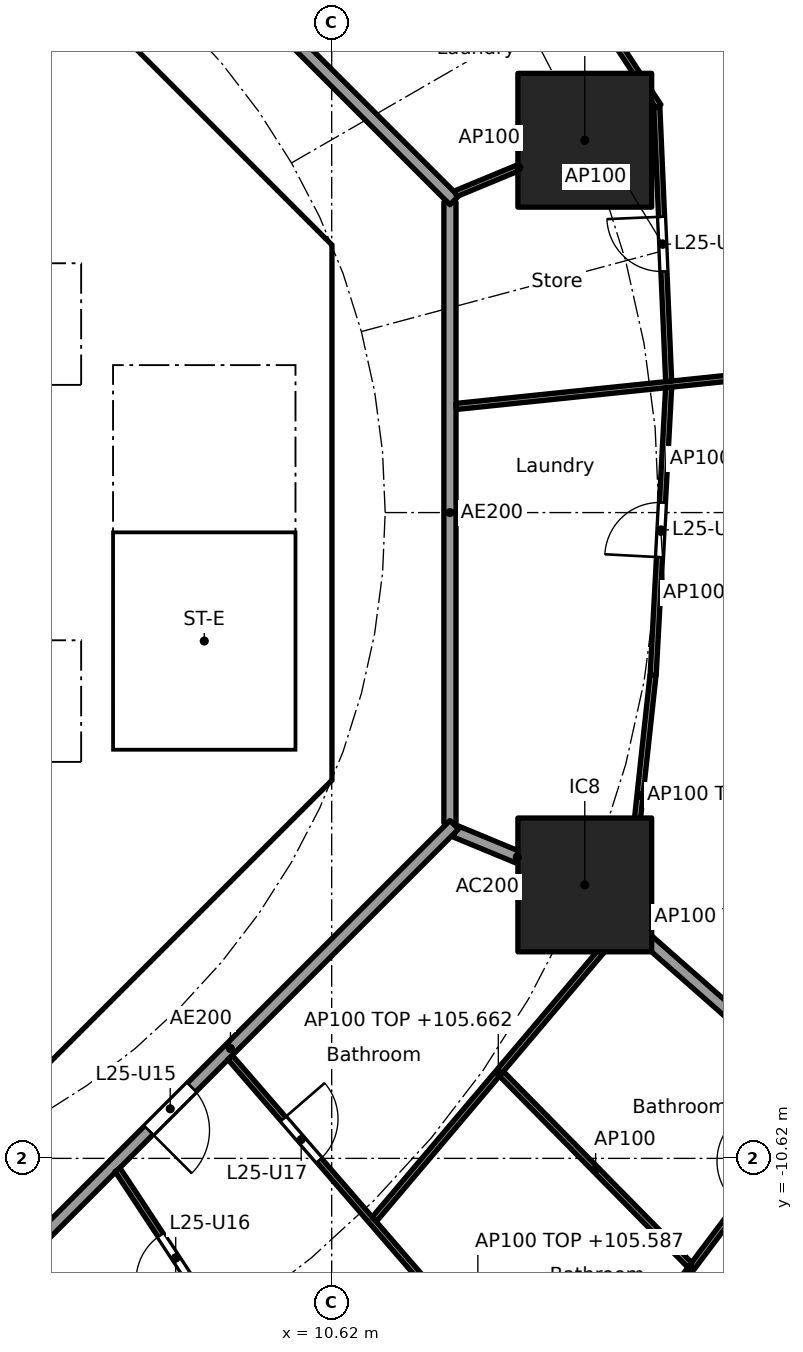
"""IFC4 building model, lengths in metres.
Left out: names, types, materials, properties, quantities, classifications, styles, units other than length and angle.
Written with IfcOpenShell. Run it as: python <this file> out.ifc"""

import sys

from ifc_helpers import new_model, si_unit, direction, frame, frame_2d, origin, origin_2d, place, context, subcontext, project, spatial, polyline, rectangle, outline, extrude, element, fill, save


model = new_model("IFC4")
c1 = context("Model", 3, precision=1e-05, world=origin(), true_north=direction((0.0, 1.0)))
c2 = subcontext(c1, "Body", "Model", "MODEL_VIEW")
j1 = project(units=[si_unit("LENGTHUNIT", "METRE"), si_unit("PLANEANGLEUNIT", "RADIAN")], contexts=[c1])
p1 = place(None, origin())
s1 = spatial("IfcSite", under=j1, at=p1, CompositionType="ELEMENT")
p2 = place(p1, origin())
s2 = spatial("IfcBuilding", under=s1, at=p2, CompositionType="ELEMENT")
p3 = place(p2, frame((0.0, 0.0, 102.9)))
s3 = spatial("IfcBuildingStorey", under=s2, at=p3, CompositionType="ELEMENT", Elevation=102.9)
for number, where, z_axis, x_axis in (
    (1, (14.782, 6.123, 0.0), (0.0, 0.0, 1.0), (1.0, 0.0, 0.0)),
    (2, (14.782, -6.123, 0.0), (0.0, 0.0, 1.0), (1.0, 0.0, 0.0)),
):
    element("IfcColumn", number, at=place(p3, frame(where, z_axis=z_axis, x_axis=x_axis)), inside=s3, PredefinedType="COLUMN", context=c2, shape_type="SweptSolid", body=[
        extrude(rectangle(XDim=2.2, YDim=2.2, at=origin_2d()), origin(), (0.0, 0.0, 1.0), 3.7),
    ])
p4 = place(p3, frame((9.988, 4.613, 0.0), z_axis=(0.0, 0.0, 1.0), x_axis=(-0.707106781187, 0.707106781187, 0.0)))
e3 = element("IfcWall", 3, at=p4, inside=s3, PredefinedType="SHEAR", context=c2, shape_type="SweptSolid", body=[
    extrude(rectangle(XDim=7.602, YDim=0.6, at=frame_2d((3.801, 0.0))), origin(), (0.0, 0.0, 1.0), 3.44),
])
p5 = place(p4, frame((3.201, 0.0, 0.0)))
e4 = element("IfcOpeningElement", 4, at=p5, cuts=e3, PredefinedType="OPENING", context=c2, shape_type="SweptSolid", body=[
    extrude(rectangle(XDim=1.2, YDim=2.1, at=frame_2d((0.6, 1.05))), frame((0.0, 0.31, 0.0), z_axis=(0.0, -1.0, 0.0), x_axis=(1.0, 0.0, 0.0)), (0.0, 0.0, 1.0), 0.62),
])
p6 = place(p3, frame((4.613, -9.988, 0.0), z_axis=(0.0, 0.0, 1.0), x_axis=(0.707106781187, 0.707106781187, 0.0)))
e5 = element("IfcWall", 5, at=p6, inside=s3, PredefinedType="SHEAR", context=c2, shape_type="SweptSolid", body=[
    extrude(rectangle(XDim=7.602, YDim=0.6, at=frame_2d((3.801, 0.0))), origin(), (0.0, 0.0, 1.0), 3.44),
])
p7 = place(p6, frame((3.201, 0.0, 0.0)))
e6 = element("IfcOpeningElement", 6, at=p7, cuts=e5, PredefinedType="OPENING", context=c2, shape_type="SweptSolid", body=[
    extrude(rectangle(XDim=1.2, YDim=2.1, at=frame_2d((0.6, 1.05))), frame((0.0, 0.31, 0.0), z_axis=(0.0, -1.0, 0.0), x_axis=(1.0, 0.0, 0.0)), (0.0, 0.0, 1.0), 0.62),
])
p8 = place(p3, frame((-6.7, 2.0, 0.0), z_axis=(0.0, 0.0, 1.0), x_axis=(1.0, 0.0, 0.0)))
e7 = element("IfcWall", 7, at=p8, inside=s3, PredefinedType="SOLIDWALL", context=c2, shape_type="SweptSolid", body=[
    extrude(rectangle(XDim=13.4, YDim=0.2, at=frame_2d((6.7, 0.0))), origin(), (0.0, 0.0, 1.0), 3.44),
])
p9 = place(p8, frame((0.65, 0.0, 0.0)))
e8 = element("IfcOpeningElement", 8, at=p9, cuts=e7, PredefinedType="OPENING", context=c2, shape_type="SweptSolid", body=[
    extrude(rectangle(XDim=1.1, YDim=2.1, at=frame_2d((0.55, 1.05))), frame((0.0, 0.11, 0.0), z_axis=(0.0, -1.0, 0.0), x_axis=(1.0, 0.0, 0.0)), (0.0, 0.0, 1.0), 0.22),
])
p10 = place(p8, frame((2.85, 0.0, 0.0)))
e9 = element("IfcOpeningElement", 9, at=p10, cuts=e7, PredefinedType="OPENING", context=c2, shape_type="SweptSolid", body=[
    extrude(rectangle(XDim=1.1, YDim=2.1, at=frame_2d((0.55, 1.05))), frame((0.0, 0.11, 0.0), z_axis=(0.0, -1.0, 0.0), x_axis=(1.0, 0.0, 0.0)), (0.0, 0.0, 1.0), 0.22),
])
p11 = place(p8, frame((5.05, 0.0, 0.0)))
e10 = element("IfcOpeningElement", 10, at=p11, cuts=e7, PredefinedType="OPENING", context=c2, shape_type="SweptSolid", body=[
    extrude(rectangle(XDim=1.1, YDim=2.1, at=frame_2d((0.55, 1.05))), frame((0.0, 0.11, 0.0), z_axis=(0.0, -1.0, 0.0), x_axis=(1.0, 0.0, 0.0)), (0.0, 0.0, 1.0), 0.22),
])
p12 = place(p3, frame((6.7, 4.0, 0.0), z_axis=(0.0, 0.0, 1.0), x_axis=(1.0, 0.0, 0.0)))
e11 = element("IfcWall", 11, at=p12, inside=s3, PredefinedType="SOLIDWALL", context=c2, shape_type="SweptSolid", body=[
    extrude(rectangle(XDim=3.325, YDim=0.2, at=frame_2d((1.662, 0.0))), origin(), (0.0, 0.0, 1.0), 3.44),
])
p13 = place(p12, frame((1.25, 0.0, 0.0)))
e12 = element("IfcOpeningElement", 12, at=p13, cuts=e11, PredefinedType="OPENING", context=c2, shape_type="SweptSolid", body=[
    extrude(rectangle(XDim=1.1, YDim=2.1, at=frame_2d((0.55, 1.05))), frame((0.0, 0.11, 0.0), z_axis=(0.0, -1.0, 0.0), x_axis=(1.0, 0.0, 0.0)), (0.0, 0.0, 1.0), 0.22),
])
p14 = place(p3, frame((-6.7, -2.0, 0.0), z_axis=(0.0, 0.0, 1.0), x_axis=(1.0, 0.0, 0.0)))
e13 = element("IfcWall", 13, at=p14, inside=s3, PredefinedType="SOLIDWALL", context=c2, shape_type="SweptSolid", body=[
    extrude(rectangle(XDim=13.4, YDim=0.2, at=frame_2d((6.7, 0.0))), origin(), (0.0, 0.0, 1.0), 3.44),
])
p15 = place(p14, frame((0.65, 0.0, 0.0)))
e14 = element("IfcOpeningElement", 14, at=p15, cuts=e13, PredefinedType="OPENING", context=c2, shape_type="SweptSolid", body=[
    extrude(rectangle(XDim=1.1, YDim=2.1, at=frame_2d((0.55, 1.05))), frame((0.0, 0.11, 0.0), z_axis=(0.0, -1.0, 0.0), x_axis=(1.0, 0.0, 0.0)), (0.0, 0.0, 1.0), 0.22),
])
p16 = place(p14, frame((2.85, 0.0, 0.0)))
e15 = element("IfcOpeningElement", 15, at=p16, cuts=e13, PredefinedType="OPENING", context=c2, shape_type="SweptSolid", body=[
    extrude(rectangle(XDim=1.1, YDim=2.1, at=frame_2d((0.55, 1.05))), frame((0.0, 0.11, 0.0), z_axis=(0.0, -1.0, 0.0), x_axis=(1.0, 0.0, 0.0)), (0.0, 0.0, 1.0), 0.22),
])
p17 = place(p3, origin())
e16 = element("IfcWall", 16, at=p17, inside=s3, PredefinedType="SHEAR", context=c2, shape_type="SweptSolid", body=[
    extrude(outline(polyline([(9.776, -4.401), (10.025, -4.152), (10.025, -3.801), (10.025, 4.152), (9.776, 4.401), (10.2, 4.825), (10.625, 4.401), (10.625, -4.401), (10.2, -4.825), (9.776, -4.401)])), origin(), (0.0, 0.0, 1.0), 3.44),
])
p18 = place(p3, origin())
e17 = element("IfcWall", 17, at=p18, inside=s3, PredefinedType="SOLIDWALL", context=c2, shape_type="SweptSolid", body=[
    extrude(outline(polyline([(-6.7, -2.1), (-6.5, -2.1), (-6.5, -4.1), (-4.5, -4.1), (-4.5, -2.1), (-4.3, -2.1), (-4.3, -4.1), (-2.3, -4.1), (-2.3, -2.1), (-2.1, -2.1), (-2.1, -4.1), (-0.1, -4.1), (-0.1, -2.1), (0.1, -2.1), (0.1, -4.1), (2.1, -4.1), (2.1, -2.1), (2.3, -2.1), (2.3, -4.1), (4.3, -4.1), (4.3, -2.1), (4.5, -2.1), (4.5, -4.1), (6.5, -4.1), (6.5, -2.1), (6.7, -2.1), (6.7, -4.3), (-6.7, -4.3), (-6.7, -2.1)])), origin(), (0.0, 0.0, 1.0), 3.44),
])
p19 = place(p3, origin())
e18 = element("IfcWall", 18, at=p19, inside=s3, PredefinedType="SOLIDWALL", context=c2, shape_type="SweptSolid", body=[
    extrude(outline(polyline([(-6.5, 2.1), (-6.7, 2.1), (-6.7, 4.3), (6.7, 4.3), (6.7, 2.1), (6.5, 2.1), (6.5, 4.1), (4.5, 4.1), (4.5, 2.1), (4.3, 2.1), (4.3, 4.1), (2.3, 4.1), (2.3, 2.1), (2.1, 2.1), (2.1, 4.1), (0.1, 4.1), (0.1, 2.1), (-0.1, 2.1), (-0.1, 4.1), (-2.1, 4.1), (-2.1, 2.1), (-2.3, 2.1), (-2.3, 4.1), (-4.3, 4.1), (-4.3, 2.1), (-4.5, 2.1), (-4.5, 4.1), (-6.5, 4.1), (-6.5, 2.1)])), origin(), (0.0, 0.0, 1.0), 3.44),
])
p20 = place(p3, origin())
e19 = element("IfcWall", 19, at=p20, inside=s3, PredefinedType="SOLIDWALL", context=c2, shape_type="SweptSolid", body=[
    extrude(outline(polyline([(7.025, -3.9), (6.7, -3.9), (6.7, 3.9), (7.025, 3.9), (7.025, -3.9)])), origin(), (0.0, 0.0, 1.0), 3.44),
])
p21 = place(p3, origin())
e20 = element("IfcWall", 20, at=p21, inside=s3, PredefinedType="SOLIDWALL", context=c2, shape_type="SweptSolid", body=[
    extrude(outline(polyline([(10.025, -4.1), (6.7, -4.1), (6.7, -3.9), (10.025, -3.9), (10.025, -4.1)])), origin(), (0.0, 0.0, 1.0), 3.44),
])
p22 = place(p3, frame((12.657, -5.243, 0.0), z_axis=(0.0, 0.0, 1.0), x_axis=(0.923876145736, -0.382691608661, 0.0)))
e21 = element("IfcWall", 21, at=p22, inside=s3, PredefinedType="PARTITIONING", context=c2, shape_type="SweptSolid", body=[
    extrude(rectangle(XDim=2.2, YDim=0.2, at=frame_2d((1.1, 0.0))), origin(), (0.0, 0.0, 1.0), 3.44),
])
p23 = place(p3, frame((14.82, -6.156, 0.0), z_axis=(0.0, 0.0, 1.0), x_axis=(0.750582231659, -0.660777052808, 0.0)))
e22 = element("IfcWall", 22, at=p23, inside=s3, PredefinedType="PARTITIONING", context=c2, shape_type="SweptSolid", body=[
    extrude(rectangle(XDim=8.781, YDim=0.2, at=frame_2d((4.391, 0.0))), origin(), (0.0, 0.0, 1.0), 2.762),
])
p24 = place(p3, frame((12.565, -5.104, 0.0), z_axis=(0.0, 0.0, 1.0), x_axis=(0.0, 1.0, 0.0)))
e23 = element("IfcWall", 23, at=p24, inside=s3, PredefinedType="PARTITIONING", context=c2, shape_type="SweptSolid", body=[
    extrude(rectangle(XDim=10.209, YDim=0.2, at=frame_2d((5.104, 0.0))), origin(), (0.0, 0.0, 1.0), 3.44),
])
p25 = place(p3, frame((12.635, 5.134, 0.0), z_axis=(0.0, 0.0, 1.0), x_axis=(-0.707106781187, 0.707106781187, 0.0)))
e24 = element("IfcWall", 24, at=p25, inside=s3, PredefinedType="PARTITIONING", context=c2, shape_type="SweptSolid", body=[
    extrude(rectangle(XDim=10.609, YDim=0.2, at=frame_2d((5.305, 0.0))), origin(), (0.0, 0.0, 1.0), 3.44),
])
p26 = place(p25, frame((4.804, 0.0, 0.0)))
e25 = element("IfcOpeningElement", 25, at=p26, cuts=e24, PredefinedType="OPENING", context=c2, shape_type="SweptSolid", body=[
    extrude(rectangle(XDim=1.0, YDim=2.1, at=frame_2d((0.5, 1.05))), frame((0.0, 0.11, 0.0), z_axis=(0.0, -1.0, 0.0), x_axis=(1.0, 0.0, 0.0)), (0.0, 0.0, 1.0), 0.22),
])
p27 = place(p3, frame((5.275, -12.494, 0.0), z_axis=(0.0, 0.0, 1.0), x_axis=(0.707106781187, 0.707106781187, 0.0)))
e26 = element("IfcWall", 26, at=p27, inside=s3, PredefinedType="PARTITIONING", context=c2, shape_type="SweptSolid", body=[
    extrude(rectangle(XDim=10.409, YDim=0.2, at=frame_2d((5.205, 0.0))), origin(), (0.0, 0.0, 1.0), 3.44),
])
p28 = place(p27, frame((3.303, 0.0, 0.0)))
e27 = element("IfcOpeningElement", 27, at=p28, cuts=e26, PredefinedType="OPENING", context=c2, shape_type="SweptSolid", body=[
    extrude(rectangle(XDim=1.0, YDim=2.1, at=frame_2d((0.5, 1.05))), frame((0.0, 0.11, 0.0), z_axis=(0.0, -1.0, 0.0), x_axis=(1.0, 0.0, 0.0)), (0.0, 0.0, 1.0), 0.22),
])
p29 = place(p3, frame((12.664, 1.745, 0.0), z_axis=(0.0, 0.0, 1.0), x_axis=(0.994662790212, 0.103179134358, 0.0)))
e28 = element("IfcWall", 28, at=p29, inside=s3, PredefinedType="PARTITIONING", context=c2, shape_type="SweptSolid", body=[
    extrude(rectangle(XDim=12.257, YDim=0.1, at=frame_2d((6.128, 0.0))), origin(), (0.0, 0.0, 1.0), 2.687),
])
p30 = place(p29, frame((5.414, 0.0, 0.0)))
e29 = element("IfcOpeningElement", 29, at=p30, cuts=e28, PredefinedType="OPENING", context=c2, shape_type="SweptSolid", body=[
    extrude(rectangle(XDim=0.9, YDim=2.1, at=frame_2d((0.45, 1.05))), frame((0.0, 0.06, 0.0), z_axis=(0.0, -1.0, 0.0), x_axis=(1.0, 0.0, 0.0)), (0.0, 0.0, 1.0), 0.12),
])
p31 = place(p3, frame((16.162, 2.158, 0.0), z_axis=(0.0, 0.0, 1.0), x_axis=(-0.043120653248, 0.999069872063, 0.0)))
e30 = element("IfcWall", 30, at=p31, inside=s3, PredefinedType="PARTITIONING", context=c2, shape_type="SweptSolid", body=[
    extrude(rectangle(XDim=4.518, YDim=0.1, at=frame_2d((2.259, 0.0))), origin(), (0.0, 0.0, 1.0), 3.44),
])
p32 = place(p31, frame((1.809, 0.0, 0.0)))
e31 = element("IfcOpeningElement", 31, at=p32, cuts=e30, PredefinedType="OPENING", context=c2, shape_type="SweptSolid", body=[
    extrude(rectangle(XDim=0.9, YDim=2.1, at=frame_2d((0.45, 1.05))), frame((0.0, 0.06, 0.0), z_axis=(0.0, -1.0, 0.0), x_axis=(1.0, 0.0, 0.0)), (0.0, 0.0, 1.0), 0.12),
])
p33 = place(p3, frame((16.161, 2.058, 0.0), z_axis=(0.0, 0.0, 1.0), x_axis=(-0.053696394729, -0.998557307916, 0.0)))
e32 = element("IfcWall", 32, at=p33, inside=s3, PredefinedType="PARTITIONING", context=c2, shape_type="SweptSolid", body=[
    extrude(rectangle(XDim=4.742, YDim=0.1, at=frame_2d((2.371, 0.0))), origin(), (0.0, 0.0, 1.0), 2.762),
])
p34 = place(p33, frame((1.896, 0.0, 0.0)))
e33 = element("IfcOpeningElement", 33, at=p34, cuts=e32, PredefinedType="OPENING", context=c2, shape_type="SweptSolid", body=[
    extrude(rectangle(XDim=0.9, YDim=2.1, at=frame_2d((0.45, 1.05))), frame((0.0, 0.06, 0.0), z_axis=(0.0, -1.0, 0.0), x_axis=(1.0, 0.0, 0.0)), (0.0, 0.0, 1.0), 0.12),
])
p35 = place(p3, frame((12.657, 5.243, 0.0), z_axis=(0.0, 0.0, 1.0), x_axis=(0.923864733477, 0.382719158442, 0.0)))
e34 = element("IfcWall", 34, at=p35, inside=s3, PredefinedType="PARTITIONING", context=c2, shape_type="SweptSolid", body=[
    extrude(rectangle(XDim=2.25, YDim=0.1, at=frame_2d((1.125, 0.0))), origin(), (0.0, 0.0, 1.0), 3.44),
])
p36 = place(p3, frame((15.992, 6.68, 0.0), z_axis=(0.0, 0.0, 1.0), x_axis=(-0.547472878942, 0.836823426311, 0.0)))
e35 = element("IfcWall", 35, at=p36, inside=s3, PredefinedType="PARTITIONING", context=c2, shape_type="SweptSolid", body=[
    extrude(rectangle(XDim=4.738, YDim=0.1, at=frame_2d((2.369, 0.0))), origin(), (0.0, 0.0, 1.0), 2.762),
])
p37 = place(p3, frame((7.1, -10.808, 0.0), z_axis=(0.0, 0.0, 1.0), x_axis=(0.550294419528, -0.834970689208, 0.0)))
e36 = element("IfcWall", 36, at=p37, inside=s3, PredefinedType="PARTITIONING", context=c2, shape_type="SweptSolid", body=[
    extrude(rectangle(XDim=3.472, YDim=0.1, at=frame_2d((1.736, 0.0))), origin(), (0.0, 0.0, 1.0), 2.687),
])
p38 = place(p37, frame((1.286, 0.0, 0.0)))
e37 = element("IfcOpeningElement", 37, at=p38, cuts=e36, PredefinedType="OPENING", context=c2, shape_type="SweptSolid", body=[
    extrude(rectangle(XDim=0.9, YDim=2.1, at=frame_2d((0.45, 1.05))), frame((0.0, 0.06, 0.0), z_axis=(0.0, -1.0, 0.0), x_axis=(1.0, 0.0, 0.0)), (0.0, 0.0, 1.0), 0.12),
])
p39 = place(p3, frame((8.95, -8.96, 0.0), z_axis=(0.0, 0.0, 1.0), x_axis=(0.65441081073, -0.756139200676, 0.0)))
e38 = element("IfcWall", 38, at=p39, inside=s3, PredefinedType="PARTITIONING", context=c2, shape_type="SweptSolid", body=[
    extrude(rectangle(XDim=12.451, YDim=0.1, at=frame_2d((6.226, 0.0))), origin(), (0.0, 0.0, 1.0), 2.687),
])
p40 = place(p39, frame((1.336, 0.0, 0.0)))
e39 = element("IfcOpeningElement", 39, at=p40, cuts=e38, PredefinedType="OPENING", context=c2, shape_type="SweptSolid", body=[
    extrude(rectangle(XDim=0.9, YDim=2.1, at=frame_2d((0.45, 1.05))), frame((0.0, 0.06, 0.0), z_axis=(0.0, -1.0, 0.0), x_axis=(1.0, 0.0, 0.0)), (0.0, 0.0, 1.0), 0.12),
])
p41 = place(p39, frame((5.501, 0.0, 0.0)))
e40 = element("IfcOpeningElement", 40, at=p41, cuts=e38, PredefinedType="OPENING", context=c2, shape_type="SweptSolid", body=[
    extrude(rectangle(XDim=0.9, YDim=2.1, at=frame_2d((0.45, 1.05))), frame((0.0, 0.06, 0.0), z_axis=(0.0, -1.0, 0.0), x_axis=(1.0, 0.0, 0.0)), (0.0, 0.0, 1.0), 0.12),
])
p42 = place(p39, frame((9.941, 0.0, 0.0)))
e41 = element("IfcOpeningElement", 41, at=p42, cuts=e38, PredefinedType="OPENING", context=c2, shape_type="SweptSolid", body=[
    extrude(rectangle(XDim=0.9, YDim=2.1, at=frame_2d((0.45, 1.05))), frame((0.0, 0.06, 0.0), z_axis=(0.0, -1.0, 0.0), x_axis=(1.0, 0.0, 0.0)), (0.0, 0.0, 1.0), 0.12),
])
p43 = place(p3, frame((11.32, -11.623, 0.0), z_axis=(0.0, 0.0, 1.0), x_axis=(0.646106810963, 0.763247003811, 0.0)))
e42 = element("IfcWall", 42, at=p43, inside=s3, PredefinedType="PARTITIONING", context=c2, shape_type="SweptSolid", body=[
    extrude(rectangle(XDim=6.317, YDim=0.1, at=frame_2d((3.159, 0.0))), origin(), (0.0, 0.0, 1.0), 2.762),
])
p44 = place(p3, frame((14.432, -15.219, 0.0), z_axis=(0.0, 0.0, 1.0), x_axis=(0.601001256685, 0.799248077548, 0.0)))
e43 = element("IfcWall", 43, at=p44, inside=s3, PredefinedType="PARTITIONING", context=c2, shape_type="SweptSolid", body=[
    extrude(rectangle(XDim=6.98, YDim=0.1, at=frame_2d((3.49, 0.0))), origin(), (0.0, 0.0, 1.0), 2.762),
])
p45 = place(p44, frame((4.798, 0.0, 0.0)))
e44 = element("IfcOpeningElement", 44, at=p45, cuts=e43, PredefinedType="OPENING", context=c2, shape_type="SweptSolid", body=[
    extrude(rectangle(XDim=0.9, YDim=2.1, at=frame_2d((0.45, 1.05))), frame((0.0, 0.06, 0.0), z_axis=(0.0, -1.0, 0.0), x_axis=(1.0, 0.0, 0.0)), (0.0, 0.0, 1.0), 0.12),
])
p46 = place(p3, frame((13.412, -9.229, 0.0), z_axis=(0.0, 0.0, 1.0), x_axis=(0.701611164285, -0.712560014421, 0.0)))
e45 = element("IfcWall", 45, at=p46, inside=s3, PredefinedType="PARTITIONING", context=c2, shape_type="SweptSolid", body=[
    extrude(rectangle(XDim=4.415, YDim=0.1, at=frame_2d((2.208, 0.0))), origin(), (0.0, 0.0, 1.0), 3.44),
])
p47 = place(p3, frame((15.477, -6.625, 0.0), z_axis=(0.0, 0.0, 1.0), x_axis=(0.107570517496, 0.994197457131, 0.0)))
e46 = element("IfcWall", 46, at=p47, inside=s3, PredefinedType="PARTITIONING", context=c2, shape_type="SweptSolid", body=[
    extrude(rectangle(XDim=3.972, YDim=0.1, at=frame_2d((1.986, 0.0))), origin(), (0.0, 0.0, 1.0), 2.762),
])
p48 = place(p13, frame((1.1, 0.0, 0.0), x_axis=(-1.0, 0.0, 0.0)))
e47 = element("IfcDoor", 47, at=p48, inside=s3, OperationType="SINGLE_SWING_RIGHT", PredefinedType="DOOR", context=c2, shape_type="SweptSolid", body=[
    extrude(rectangle(XDim=1.1, YDim=2.1, at=frame_2d((0.55, 1.05))), frame((0.0, 0.025, 0.0), z_axis=(0.0, -1.0, 0.0), x_axis=(1.0, 0.0, 0.0)), (0.0, 0.0, 1.0), 0.05),
])
fill(e12, e47)
p49 = place(p5, origin())
e48 = element("IfcDoor", 48, at=p49, inside=s3, OperationType="SINGLE_SWING_LEFT", PredefinedType="DOOR", context=c2, shape_type="SweptSolid", body=[
    extrude(rectangle(XDim=1.2, YDim=2.1, at=frame_2d((0.6, 1.05))), frame((0.0, 0.025, 0.0), z_axis=(0.0, -1.0, 0.0), x_axis=(1.0, 0.0, 0.0)), (0.0, 0.0, 1.0), 0.05),
])
fill(e4, e48)
p50 = place(p7, origin())
e49 = element("IfcDoor", 49, at=p50, inside=s3, OperationType="SINGLE_SWING_LEFT", PredefinedType="DOOR", context=c2, shape_type="SweptSolid", body=[
    extrude(rectangle(XDim=1.2, YDim=2.1, at=frame_2d((0.6, 1.05))), frame((0.0, 0.025, 0.0), z_axis=(0.0, -1.0, 0.0), x_axis=(1.0, 0.0, 0.0)), (0.0, 0.0, 1.0), 0.05),
])
fill(e6, e49)
p51 = place(p28, frame((1.0, 0.0, 0.0), x_axis=(-1.0, 0.0, 0.0)))
e50 = element("IfcDoor", 50, at=p51, inside=s3, OperationType="SINGLE_SWING_RIGHT", PredefinedType="DOOR", context=c2, shape_type="SweptSolid", body=[
    extrude(rectangle(XDim=1.0, YDim=2.1, at=frame_2d((0.5, 1.05))), frame((0.0, 0.025, 0.0), z_axis=(0.0, -1.0, 0.0), x_axis=(1.0, 0.0, 0.0)), (0.0, 0.0, 1.0), 0.05),
])
fill(e27, e50)
p52 = place(p38, frame((0.9, 0.0, 0.0), x_axis=(-1.0, 0.0, 0.0)))
e51 = element("IfcDoor", 51, at=p52, inside=s3, OperationType="SINGLE_SWING_LEFT", PredefinedType="DOOR", context=c2, shape_type="SweptSolid", body=[
    extrude(rectangle(XDim=0.9, YDim=2.1, at=frame_2d((0.45, 1.05))), frame((0.0, 0.025, 0.0), z_axis=(0.0, -1.0, 0.0), x_axis=(1.0, 0.0, 0.0)), (0.0, 0.0, 1.0), 0.05),
])
fill(e37, e51)
p53 = place(p40, origin())
e52 = element("IfcDoor", 52, at=p53, inside=s3, OperationType="SINGLE_SWING_LEFT", PredefinedType="DOOR", context=c2, shape_type="SweptSolid", body=[
    extrude(rectangle(XDim=0.9, YDim=2.1, at=frame_2d((0.45, 1.05))), frame((0.0, 0.025, 0.0), z_axis=(0.0, -1.0, 0.0), x_axis=(1.0, 0.0, 0.0)), (0.0, 0.0, 1.0), 0.05),
])
fill(e39, e52)
p54 = place(p32, origin())
e53 = element("IfcDoor", 53, at=p54, inside=s3, OperationType="SINGLE_SWING_RIGHT", PredefinedType="DOOR", context=c2, shape_type="SweptSolid", body=[
    extrude(rectangle(XDim=0.9, YDim=2.1, at=frame_2d((0.45, 1.05))), frame((0.0, 0.025, 0.0), z_axis=(0.0, -1.0, 0.0), x_axis=(1.0, 0.0, 0.0)), (0.0, 0.0, 1.0), 0.05),
])
fill(e31, e53)
p55 = place(p34, frame((0.9, 0.0, 0.0), x_axis=(-1.0, 0.0, 0.0)))
e54 = element("IfcDoor", 54, at=p55, inside=s3, OperationType="SINGLE_SWING_LEFT", PredefinedType="DOOR", context=c2, shape_type="SweptSolid", body=[
    extrude(rectangle(XDim=0.9, YDim=2.1, at=frame_2d((0.45, 1.05))), frame((0.0, 0.025, 0.0), z_axis=(0.0, -1.0, 0.0), x_axis=(1.0, 0.0, 0.0)), (0.0, 0.0, 1.0), 0.05),
])
fill(e33, e54)
save(model, sys.argv[1])
